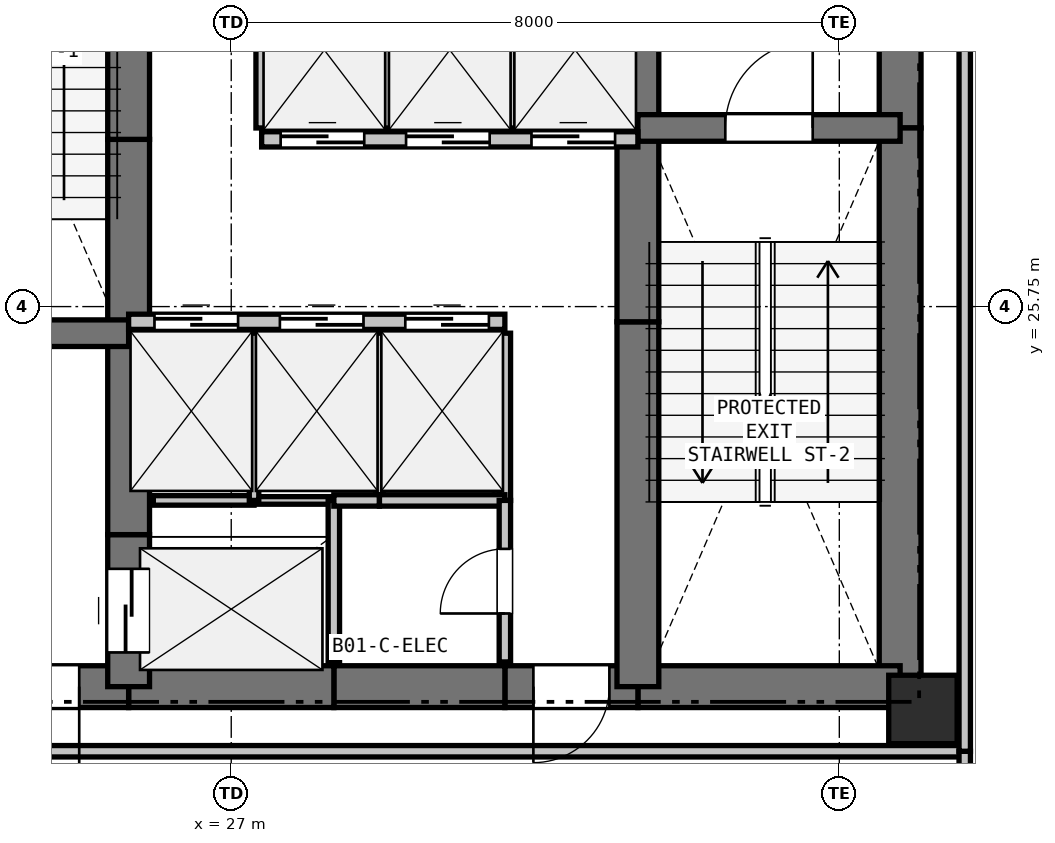
"""IFC4 building model, lengths in metres.
Left out: names, types, materials, properties, quantities, classifications, styles, units other than length and angle.
Written with IfcOpenShell. Run it as: python <this file> out.ifc"""

import sys

from ifc_helpers import new_model, si_unit, direction, frame, frame_2d, origin, origin_2d, place, context, subcontext, project, spatial, rectangle, extrude, element, fill, save


model = new_model("IFC4")
c1 = context("Model", 3, precision=1e-05, world=origin(), true_north=direction((0.0, 1.0)))
c2 = subcontext(c1, "Body", "Model", "MODEL_VIEW")
j1 = project(units=[si_unit("LENGTHUNIT", "METRE"), si_unit("PLANEANGLEUNIT", "RADIAN")], contexts=[c1])
p1 = place(None, origin())
s1 = spatial("IfcSite", under=j1, at=p1, CompositionType="ELEMENT")
p2 = place(p1, origin())
s2 = spatial("IfcBuilding", under=s1, at=p2, CompositionType="ELEMENT")
p3 = place(p2, frame((0.0, 0.0, -4.5)))
s3 = spatial("IfcBuildingStorey", under=s2, at=p3, CompositionType="ELEMENT", Elevation=-4.5)
p4 = place(p3, frame((36.1, 20.45, 0.0), z_axis=(0.0, 0.0, 1.0), x_axis=(1.0, 0.0, 0.0)))
e1 = element("IfcColumn", 1, at=p4, inside=s3, PredefinedType="COLUMN", context=c2, shape_type="SweptSolid", body=[
    extrude(rectangle(XDim=0.9, YDim=0.9, at=origin_2d()), origin(), (0.0, 0.0, 1.0), 4.5),
])
p5 = place(p3, frame((35.8, 32.75, 0.0), z_axis=(0.0, 0.0, 1.0), x_axis=(0.0, -1.0, 0.0)))
e2 = element("IfcWall", 2, at=p5, inside=s3, PredefinedType="SHEAR", context=c2, shape_type="SweptSolid", body=[
    extrude(rectangle(XDim=4.65, YDim=0.55, at=frame_2d((2.325, 0.0))), origin(), (0.0, 0.0, 1.0), 4.2),
])
p6 = place(p3, frame((35.8, 28.1, 0.0), z_axis=(0.0, 0.0, 1.0), x_axis=(0.0, -1.0, 0.0)))
e3 = element("IfcWall", 3, at=p6, inside=s3, PredefinedType="SHEAR", context=c2, shape_type="SweptSolid", body=[
    extrude(rectangle(XDim=7.35, YDim=0.55, at=frame_2d((3.675, 0.0))), origin(), (0.0, 0.0, 1.0), 4.2),
])
p7 = place(p3, frame((35.8, 20.75, 0.0), z_axis=(0.0, 0.0, 1.0), x_axis=(-1.0, 0.0, 0.0)))
e4 = element("IfcWall", 4, at=p7, inside=s3, PredefinedType="SHEAR", context=c2, shape_type="SweptSolid", body=[
    extrude(rectangle(XDim=3.45, YDim=0.55, at=frame_2d((1.725, 0.0))), origin(), (0.0, 0.0, 1.0), 4.2),
])
p8 = place(p3, frame((32.35, 20.75, 0.0), z_axis=(0.0, 0.0, 1.0), x_axis=(-1.0, 0.0, 0.0)))
e5 = element("IfcWall", 5, at=p8, inside=s3, PredefinedType="SHEAR", context=c2, shape_type="SweptSolid", body=[
    extrude(rectangle(XDim=1.75, YDim=0.55, at=frame_2d((0.875, 0.0))), origin(), (0.0, 0.0, 1.0), 4.2),
])
p9 = place(p8, frame((0.375, 0.0, 0.0)))
e6 = element("IfcOpeningElement", 6, at=p9, cuts=e5, PredefinedType="OPENING", context=c2, shape_type="SweptSolid", body=[
    extrude(rectangle(XDim=1.0, YDim=2.15, at=frame_2d((0.5, 1.075))), frame((0.0, 0.285, 0.0), z_axis=(0.0, -1.0, 0.0), x_axis=(1.0, 0.0, 0.0)), (0.0, 0.0, 1.0), 0.57),
])
p10 = place(p3, frame((30.6, 20.75, 0.0), z_axis=(0.0, 0.0, 1.0), x_axis=(-1.0, 0.0, 0.0)))
e7 = element("IfcWall", 7, at=p10, inside=s3, PredefinedType="SHEAR", context=c2, shape_type="SweptSolid", body=[
    extrude(rectangle(XDim=2.25, YDim=0.55, at=frame_2d((1.125, 0.0))), origin(), (0.0, 0.0, 1.0), 4.2),
])
p11 = place(p3, frame((28.35, 20.75, 0.0), z_axis=(0.0, 0.0, 1.0), x_axis=(-1.0, 0.0, 0.0)))
e8 = element("IfcWall", 8, at=p11, inside=s3, PredefinedType="SHEAR", context=c2, shape_type="SweptSolid", body=[
    extrude(rectangle(XDim=2.7, YDim=0.55, at=frame_2d((1.35, 0.0))), origin(), (0.0, 0.0, 1.0), 4.2),
])
p12 = place(p3, frame((25.65, 20.75, 0.0), z_axis=(0.0, 0.0, 1.0), x_axis=(-1.0, 0.0, 0.0)))
e9 = element("IfcWall", 9, at=p12, inside=s3, PredefinedType="SHEAR", context=c2, shape_type="SweptSolid", body=[
    extrude(rectangle(XDim=3.45, YDim=0.55, at=frame_2d((1.725, 0.0))), origin(), (0.0, 0.0, 1.0), 4.2),
])
p13 = place(p12, frame((0.65, 0.0, 0.0)))
e10 = element("IfcOpeningElement", 10, at=p13, cuts=e9, PredefinedType="OPENING", context=c2, shape_type="SweptSolid", body=[
    extrude(rectangle(XDim=1.15, YDim=2.15, at=frame_2d((0.575, 1.075))), frame((0.0, 0.285, 0.0), z_axis=(0.0, -1.0, 0.0), x_axis=(1.0, 0.0, 0.0)), (0.0, 0.0, 1.0), 0.57),
])
p14 = place(p3, frame((25.65, 20.75, 0.0), z_axis=(0.0, 0.0, 1.0), x_axis=(0.0, 1.0, 0.0)))
e11 = element("IfcWall", 11, at=p14, inside=s3, PredefinedType="SHEAR", context=c2, shape_type="SweptSolid", body=[
    extrude(rectangle(XDim=2.0, YDim=0.55, at=frame_2d((1.0, 0.0))), origin(), (0.0, 0.0, 1.0), 4.2),
])
p15 = place(p14, frame((0.45, 0.0, 0.0)))
e12 = element("IfcOpeningElement", 12, at=p15, cuts=e11, PredefinedType="OPENING", context=c2, shape_type="SweptSolid", body=[
    extrude(rectangle(XDim=1.1, YDim=2.15, at=frame_2d((0.55, 1.075))), frame((0.0, 0.285, 0.0), z_axis=(0.0, -1.0, 0.0), x_axis=(1.0, 0.0, 0.0)), (0.0, 0.0, 1.0), 0.57),
])
p16 = place(p3, frame((25.65, 22.75, 0.0), z_axis=(0.0, 0.0, 1.0), x_axis=(0.0, 1.0, 0.0)))
e13 = element("IfcWall", 13, at=p16, inside=s3, PredefinedType="SHEAR", context=c2, shape_type="SweptSolid", body=[
    extrude(rectangle(XDim=2.8, YDim=0.55, at=frame_2d((1.4, 0.0))), origin(), (0.0, 0.0, 1.0), 4.2),
])
p17 = place(p3, frame((25.65, 25.55, 0.0), z_axis=(0.0, 0.0, 1.0), x_axis=(0.0, 1.0, 0.0)))
e14 = element("IfcWall", 14, at=p17, inside=s3, PredefinedType="SHEAR", context=c2, shape_type="SweptSolid", body=[
    extrude(rectangle(XDim=2.4, YDim=0.55, at=frame_2d((1.2, 0.0))), origin(), (0.0, 0.0, 1.0), 4.2),
])
for number, where, z_axis, x_axis in (
    (15, (25.65, 27.95, 0.0), (0.0, 0.0, 1.0), (0.0, 1.0, 0.0)),
    (16, (32.35, 20.75, 0.0), (0.0, 0.0, 1.0), (0.0, 1.0, 0.0)),
):
    element("IfcWall", number, at=place(p3, frame(where, z_axis=z_axis, x_axis=x_axis)), inside=s3, PredefinedType="SHEAR", context=c2, shape_type="SweptSolid", body=[
        extrude(rectangle(XDim=4.8, YDim=0.55, at=frame_2d((2.4, 0.0))), origin(), (0.0, 0.0, 1.0), 4.2),
    ])
p18 = place(p3, frame((32.35, 25.55, 0.0), z_axis=(0.0, 0.0, 1.0), x_axis=(0.0, 1.0, 0.0)))
e17 = element("IfcWall", 17, at=p18, inside=s3, PredefinedType="SHEAR", context=c2, shape_type="SweptSolid", body=[
    extrude(rectangle(XDim=2.4, YDim=0.55, at=frame_2d((1.2, 0.0))), origin(), (0.0, 0.0, 1.0), 4.2),
])
p19 = place(p3, frame((32.35, 27.95, 0.0), z_axis=(0.0, 0.0, 1.0), x_axis=(0.0, 1.0, 0.0)))
e18 = element("IfcWall", 18, at=p19, inside=s3, PredefinedType="SHEAR", context=c2, shape_type="SweptSolid", body=[
    extrude(rectangle(XDim=2.8, YDim=0.55, at=frame_2d((1.4, 0.0))), origin(), (0.0, 0.0, 1.0), 4.2),
])
p20 = place(p3, frame((22.2, 25.4, 0.0), z_axis=(0.0, 0.0, 1.0), x_axis=(1.0, 0.0, 0.0)))
e19 = element("IfcWall", 19, at=p20, inside=s3, PredefinedType="SHEAR", context=c2, shape_type="SweptSolid", body=[
    extrude(rectangle(XDim=3.45, YDim=0.35, at=frame_2d((1.725, 0.0))), origin(), (0.0, 0.0, 1.0), 4.2),
])
p21 = place(p20, frame((1.15, 0.0, 0.0)))
e20 = element("IfcOpeningElement", 20, at=p21, cuts=e19, PredefinedType="OPENING", context=c2, shape_type="SweptSolid", body=[
    extrude(rectangle(XDim=1.15, YDim=2.15, at=frame_2d((0.575, 1.075))), frame((0.0, 0.185, 0.0), z_axis=(0.0, -1.0, 0.0), x_axis=(1.0, 0.0, 0.0)), (0.0, 0.0, 1.0), 0.37),
])
p22 = place(p3, frame((32.35, 28.1, 0.0), z_axis=(0.0, 0.0, 1.0), x_axis=(1.0, 0.0, 0.0)))
e21 = element("IfcWall", 21, at=p22, inside=s3, PredefinedType="SHEAR", context=c2, shape_type="SweptSolid", body=[
    extrude(rectangle(XDim=3.45, YDim=0.35, at=frame_2d((1.725, 0.0))), origin(), (0.0, 0.0, 1.0), 4.2),
])
p23 = place(p22, frame((1.15, 0.0, 0.0)))
e22 = element("IfcOpeningElement", 22, at=p23, cuts=e21, PredefinedType="OPENING", context=c2, shape_type="SweptSolid", body=[
    extrude(rectangle(XDim=1.15, YDim=2.15, at=frame_2d((0.575, 1.075))), frame((0.0, 0.185, 0.0), z_axis=(0.0, -1.0, 0.0), x_axis=(1.0, 0.0, 0.0)), (0.0, 0.0, 1.0), 0.37),
])
p24 = place(p3, frame((25.65, 25.55, 0.0), z_axis=(0.0, 0.0, 1.0), x_axis=(1.0, 0.0, 0.0)))
e23 = element("IfcWall", 23, at=p24, inside=s3, PredefinedType="PARTITIONING", context=c2, shape_type="SweptSolid", body=[
    extrude(rectangle(XDim=4.95, YDim=0.2, at=frame_2d((2.475, 0.0))), origin(), (0.0, 0.0, 1.0), 4.2),
])
p25 = place(p24, frame((0.34, 0.0, 0.0)))
e24 = element("IfcOpeningElement", 24, at=p25, cuts=e23, PredefinedType="OPENING", context=c2, shape_type="SweptSolid", body=[
    extrude(rectangle(XDim=1.1, YDim=2.15, at=frame_2d((0.55, 1.075))), frame((0.0, 0.11, 0.0), z_axis=(0.0, -1.0, 0.0), x_axis=(1.0, 0.0, 0.0)), (0.0, 0.0, 1.0), 0.22),
])
p26 = place(p24, frame((1.99, 0.0, 0.0)))
e25 = element("IfcOpeningElement", 25, at=p26, cuts=e23, PredefinedType="OPENING", context=c2, shape_type="SweptSolid", body=[
    extrude(rectangle(XDim=1.1, YDim=2.15, at=frame_2d((0.55, 1.075))), frame((0.0, 0.11, 0.0), z_axis=(0.0, -1.0, 0.0), x_axis=(1.0, 0.0, 0.0)), (0.0, 0.0, 1.0), 0.22),
])
p27 = place(p24, frame((3.64, 0.0, 0.0)))
e26 = element("IfcOpeningElement", 26, at=p27, cuts=e23, PredefinedType="OPENING", context=c2, shape_type="SweptSolid", body=[
    extrude(rectangle(XDim=1.1, YDim=2.15, at=frame_2d((0.55, 1.075))), frame((0.0, 0.11, 0.0), z_axis=(0.0, -1.0, 0.0), x_axis=(1.0, 0.0, 0.0)), (0.0, 0.0, 1.0), 0.22),
])
p28 = place(p3, frame((27.4, 27.95, 0.0), z_axis=(0.0, 0.0, 1.0), x_axis=(1.0, 0.0, 0.0)))
e27 = element("IfcWall", 27, at=p28, inside=s3, PredefinedType="PARTITIONING", context=c2, shape_type="SweptSolid", body=[
    extrude(rectangle(XDim=4.95, YDim=0.2, at=frame_2d((2.475, 0.0))), origin(), (0.0, 0.0, 1.0), 4.2),
])
p29 = place(p28, frame((0.25, 0.0, 0.0)))
e28 = element("IfcOpeningElement", 28, at=p29, cuts=e27, PredefinedType="OPENING", context=c2, shape_type="SweptSolid", body=[
    extrude(rectangle(XDim=1.1, YDim=2.15, at=frame_2d((0.55, 1.075))), frame((0.0, 0.11, 0.0), z_axis=(0.0, -1.0, 0.0), x_axis=(1.0, 0.0, 0.0)), (0.0, 0.0, 1.0), 0.22),
])
p30 = place(p28, frame((1.9, 0.0, 0.0)))
e29 = element("IfcOpeningElement", 29, at=p30, cuts=e27, PredefinedType="OPENING", context=c2, shape_type="SweptSolid", body=[
    extrude(rectangle(XDim=1.1, YDim=2.15, at=frame_2d((0.55, 1.075))), frame((0.0, 0.11, 0.0), z_axis=(0.0, -1.0, 0.0), x_axis=(1.0, 0.0, 0.0)), (0.0, 0.0, 1.0), 0.22),
])
p31 = place(p28, frame((3.55, 0.0, 0.0)))
e30 = element("IfcOpeningElement", 30, at=p31, cuts=e27, PredefinedType="OPENING", context=c2, shape_type="SweptSolid", body=[
    extrude(rectangle(XDim=1.1, YDim=2.15, at=frame_2d((0.55, 1.075))), frame((0.0, 0.11, 0.0), z_axis=(0.0, -1.0, 0.0), x_axis=(1.0, 0.0, 0.0)), (0.0, 0.0, 1.0), 0.22),
])
p32 = place(p3, frame((25.975, 23.2, 0.0), z_axis=(0.0, 0.0, 1.0), x_axis=(1.0, 0.0, 0.0)))
e31 = element("IfcWall", 31, at=p32, inside=s3, PredefinedType="PARTITIONING", context=c2, shape_type="SweptSolid", body=[
    extrude(rectangle(XDim=1.325, YDim=0.125, at=frame_2d((0.663, 0.0))), origin(), (0.0, 0.0, 1.0), 4.2),
])
p33 = place(p3, frame((27.3, 23.2, 0.0), z_axis=(0.0, 0.0, 1.0), x_axis=(1.0, 0.0, 0.0)))
e32 = element("IfcWall", 32, at=p33, inside=s3, PredefinedType="PARTITIONING", context=c2, shape_type="SweptSolid", body=[
    extrude(rectangle(XDim=1.05, YDim=0.1, at=frame_2d((0.525, 0.0))), origin(), (0.0, 0.0, 1.0), 4.2),
])
p34 = place(p3, frame((28.35, 23.2, 0.0), z_axis=(0.0, 0.0, 1.0), x_axis=(0.0, -1.0, 0.0)))
e33 = element("IfcWall", 33, at=p34, inside=s3, PredefinedType="PARTITIONING", context=c2, shape_type="SweptSolid", body=[
    extrude(rectangle(XDim=2.125, YDim=0.15, at=frame_2d((1.062, 0.0))), origin(), (0.0, 0.0, 1.0), 4.2),
])
p35 = place(p3, frame((27.3, 25.4, 0.0), z_axis=(0.0, 0.0, 1.0), x_axis=(0.0, -1.0, 0.0)))
e34 = element("IfcWall", 34, at=p35, inside=s3, PredefinedType="PARTITIONING", context=c2, shape_type="SweptSolid", body=[
    extrude(rectangle(XDim=2.2, YDim=0.125, at=frame_2d((1.1, 0.0))), origin(), (0.0, 0.0, 1.0), 4.2),
])
p36 = place(p3, frame((28.95, 25.4, 0.0), z_axis=(0.0, 0.0, 1.0), x_axis=(0.0, -1.0, 0.0)))
e35 = element("IfcWall", 35, at=p36, inside=s3, PredefinedType="PARTITIONING", context=c2, shape_type="SweptSolid", body=[
    extrude(rectangle(XDim=2.2, YDim=0.1, at=frame_2d((1.1, 0.0))), origin(), (0.0, 0.0, 1.0), 4.2),
])
p37 = place(p3, frame((28.95, 23.2, 0.0), z_axis=(0.0, 0.0, 1.0), x_axis=(-1.0, 0.0, 0.0)))
e36 = element("IfcWall", 36, at=p37, inside=s3, PredefinedType="PARTITIONING", context=c2, shape_type="SweptSolid", body=[
    extrude(rectangle(XDim=0.6, YDim=0.15, at=frame_2d((0.3, 0.0))), origin(), (0.0, 0.0, 1.0), 4.2),
])
p38 = place(p3, frame((30.6, 25.4, 0.0), z_axis=(0.0, 0.0, 1.0), x_axis=(0.0, -1.0, 0.0)))
e37 = element("IfcWall", 37, at=p38, inside=s3, PredefinedType="PARTITIONING", context=c2, shape_type="SweptSolid", body=[
    extrude(rectangle(XDim=2.2, YDim=0.15, at=frame_2d((1.1, 0.0))), origin(), (0.0, 0.0, 1.0), 4.2),
])
p39 = place(p3, frame((30.6, 23.2, 0.0), z_axis=(0.0, 0.0, 1.0), x_axis=(-1.0, 0.0, 0.0)))
e38 = element("IfcWall", 38, at=p39, inside=s3, PredefinedType="PARTITIONING", context=c2, shape_type="SweptSolid", body=[
    extrude(rectangle(XDim=1.65, YDim=0.15, at=frame_2d((0.825, 0.0))), origin(), (0.0, 0.0, 1.0), 4.2),
])
p40 = place(p3, frame((29.05, 30.3, 0.0), z_axis=(0.0, 0.0, 1.0), x_axis=(0.0, -1.0, 0.0)))
e39 = element("IfcWall", 39, at=p40, inside=s3, PredefinedType="PARTITIONING", context=c2, shape_type="SweptSolid", body=[
    extrude(rectangle(XDim=2.2, YDim=0.125, at=frame_2d((1.1, 0.0))), origin(), (0.0, 0.0, 1.0), 4.2),
])
p41 = place(p3, frame((27.4, 28.1, 0.0), z_axis=(0.0, 0.0, 1.0), x_axis=(0.0, 1.0, 0.0)))
e40 = element("IfcWall", 40, at=p41, inside=s3, PredefinedType="PARTITIONING", context=c2, shape_type="SweptSolid", body=[
    extrude(rectangle(XDim=2.2, YDim=0.15, at=frame_2d((1.1, 0.0))), origin(), (0.0, 0.0, 1.0), 4.2),
])
p42 = place(p3, frame((30.7, 30.3, 0.0), z_axis=(0.0, 0.0, 1.0), x_axis=(0.0, -1.0, 0.0)))
e41 = element("IfcWall", 41, at=p42, inside=s3, PredefinedType="PARTITIONING", context=c2, shape_type="SweptSolid", body=[
    extrude(rectangle(XDim=2.2, YDim=0.1, at=frame_2d((1.1, 0.0))), origin(), (0.0, 0.0, 1.0), 4.2),
])
p43 = place(p3, frame((30.6, 21.075, 0.0), z_axis=(0.0, 0.0, 1.0), x_axis=(0.0, 1.0, 0.0)))
e42 = element("IfcWall", 42, at=p43, inside=s3, PredefinedType="PARTITIONING", context=c2, shape_type="SweptSolid", body=[
    extrude(rectangle(XDim=2.125, YDim=0.15, at=frame_2d((1.062, 0.0))), origin(), (0.0, 0.0, 1.0), 4.2),
])
p44 = place(p43, frame((0.637, 0.0, 0.0)))
e43 = element("IfcOpeningElement", 43, at=p44, cuts=e42, PredefinedType="OPENING", context=c2, shape_type="SweptSolid", body=[
    extrude(rectangle(XDim=0.85, YDim=2.1, at=frame_2d((0.425, 1.05))), frame((0.0, 0.085, 0.0), z_axis=(0.0, -1.0, 0.0), x_axis=(1.0, 0.0, 0.0)), (0.0, 0.0, 1.0), 0.17),
])
p45 = place(p3, frame((21.35, 19.9, 0.0), z_axis=(0.0, 0.0, 1.0), x_axis=(1.0, 0.0, 0.0)))
e44 = element("IfcWall", 44, at=p45, inside=s3, PredefinedType="PARTITIONING", context=c2, shape_type="SweptSolid", body=[
    extrude(rectangle(XDim=15.3, YDim=0.15, at=frame_2d((7.65, 0.0))), origin(), (0.0, 0.0, 1.0), 4.2),
])
p46 = place(p3, frame((36.65, 19.9, 0.0), z_axis=(0.0, 0.0, 1.0), x_axis=(0.0, -1.0, 0.0)))
e45 = element("IfcWall", 45, at=p46, inside=s3, PredefinedType="PARTITIONING", context=c2, shape_type="SweptSolid", body=[
    extrude(rectangle(XDim=3.2, YDim=0.15, at=frame_2d((1.6, 0.0))), origin(), (0.0, 0.0, 1.0), 4.2),
])
p47 = place(p46, frame((1.1, 0.0, 0.0)))
e46 = element("IfcOpeningElement", 46, at=p47, cuts=e45, PredefinedType="OPENING", context=c2, shape_type="SweptSolid", body=[
    extrude(rectangle(XDim=1.0, YDim=2.15, at=frame_2d((0.5, 1.075))), frame((0.0, 0.085, 0.0), z_axis=(0.0, -1.0, 0.0), x_axis=(1.0, 0.0, 0.0)), (0.0, 0.0, 1.0), 0.17),
])
p48 = place(p3, frame((36.65, 19.9, 0.0), z_axis=(0.0, 0.0, 1.0), x_axis=(0.0, 1.0, 0.0)))
e47 = element("IfcWall", 47, at=p48, inside=s3, PredefinedType="PARTITIONING", context=c2, shape_type="SweptSolid", body=[
    extrude(rectangle(XDim=13.7, YDim=0.15, at=frame_2d((6.85, 0.0))), origin(), (0.0, 0.0, 1.0), 4.2),
])
p49 = place(p25, origin())
e48 = element("IfcDoor", 48, at=p49, inside=s3, OperationType="SLIDING_TO_LEFT", PredefinedType="DOOR", context=c2, shape_type="SweptSolid", body=[
    extrude(rectangle(XDim=1.1, YDim=2.15, at=frame_2d((0.55, 1.075))), frame((0.0, 0.025, 0.0), z_axis=(0.0, -1.0, 0.0), x_axis=(1.0, 0.0, 0.0)), (0.0, 0.0, 1.0), 0.05),
])
fill(e24, e48)
p50 = place(p26, origin())
e49 = element("IfcDoor", 49, at=p50, inside=s3, OperationType="SLIDING_TO_LEFT", PredefinedType="DOOR", context=c2, shape_type="SweptSolid", body=[
    extrude(rectangle(XDim=1.1, YDim=2.15, at=frame_2d((0.55, 1.075))), frame((0.0, 0.025, 0.0), z_axis=(0.0, -1.0, 0.0), x_axis=(1.0, 0.0, 0.0)), (0.0, 0.0, 1.0), 0.05),
])
fill(e25, e49)
p51 = place(p27, origin())
e50 = element("IfcDoor", 50, at=p51, inside=s3, OperationType="SLIDING_TO_LEFT", PredefinedType="DOOR", context=c2, shape_type="SweptSolid", body=[
    extrude(rectangle(XDim=1.1, YDim=2.15, at=frame_2d((0.55, 1.075))), frame((0.0, 0.025, 0.0), z_axis=(0.0, -1.0, 0.0), x_axis=(1.0, 0.0, 0.0)), (0.0, 0.0, 1.0), 0.05),
])
fill(e26, e50)
p52 = place(p29, origin())
e51 = element("IfcDoor", 51, at=p52, inside=s3, OperationType="SLIDING_TO_LEFT", PredefinedType="DOOR", context=c2, shape_type="SweptSolid", body=[
    extrude(rectangle(XDim=1.1, YDim=2.15, at=frame_2d((0.55, 1.075))), frame((0.0, 0.025, 0.0), z_axis=(0.0, -1.0, 0.0), x_axis=(1.0, 0.0, 0.0)), (0.0, 0.0, 1.0), 0.05),
])
fill(e28, e51)
p53 = place(p30, origin())
e52 = element("IfcDoor", 52, at=p53, inside=s3, OperationType="SLIDING_TO_LEFT", PredefinedType="DOOR", context=c2, shape_type="SweptSolid", body=[
    extrude(rectangle(XDim=1.1, YDim=2.15, at=frame_2d((0.55, 1.075))), frame((0.0, 0.025, 0.0), z_axis=(0.0, -1.0, 0.0), x_axis=(1.0, 0.0, 0.0)), (0.0, 0.0, 1.0), 0.05),
])
fill(e29, e52)
p54 = place(p31, origin())
e53 = element("IfcDoor", 53, at=p54, inside=s3, OperationType="SLIDING_TO_LEFT", PredefinedType="DOOR", context=c2, shape_type="SweptSolid", body=[
    extrude(rectangle(XDim=1.1, YDim=2.15, at=frame_2d((0.55, 1.075))), frame((0.0, 0.025, 0.0), z_axis=(0.0, -1.0, 0.0), x_axis=(1.0, 0.0, 0.0)), (0.0, 0.0, 1.0), 0.05),
])
fill(e30, e53)
p55 = place(p9, origin())
e54 = element("IfcDoor", 54, at=p55, inside=s3, OperationType="SINGLE_SWING_RIGHT", PredefinedType="DOOR", context=c2, shape_type="SweptSolid", body=[
    extrude(rectangle(XDim=1.0, YDim=2.15, at=frame_2d((0.5, 1.075))), frame((0.0, 0.025, 0.0), z_axis=(0.0, -1.0, 0.0), x_axis=(1.0, 0.0, 0.0)), (0.0, 0.0, 1.0), 0.05),
])
fill(e6, e54)
p56 = place(p15, origin())
e55 = element("IfcDoor", 55, at=p56, inside=s3, OperationType="SLIDING_TO_LEFT", PredefinedType="DOOR", context=c2, shape_type="SweptSolid", body=[
    extrude(rectangle(XDim=1.1, YDim=2.15, at=frame_2d((0.55, 1.075))), frame((0.0, 0.025, 0.0), z_axis=(0.0, -1.0, 0.0), x_axis=(1.0, 0.0, 0.0)), (0.0, 0.0, 1.0), 0.05),
])
fill(e12, e55)
p57 = place(p23, origin())
e56 = element("IfcDoor", 56, at=p57, inside=s3, OperationType="SINGLE_SWING_RIGHT", PredefinedType="DOOR", context=c2, shape_type="SweptSolid", body=[
    extrude(rectangle(XDim=1.15, YDim=2.15, at=frame_2d((0.575, 1.075))), frame((0.0, 0.025, 0.0), z_axis=(0.0, -1.0, 0.0), x_axis=(1.0, 0.0, 0.0)), (0.0, 0.0, 1.0), 0.05),
])
fill(e22, e56)
p58 = place(p13, origin())
e57 = element("IfcDoor", 57, at=p58, inside=s3, OperationType="SINGLE_SWING_LEFT", PredefinedType="DOOR", context=c2, shape_type="SweptSolid", body=[
    extrude(rectangle(XDim=1.15, YDim=2.15, at=frame_2d((0.575, 1.075))), frame((0.0, 0.025, 0.0), z_axis=(0.0, -1.0, 0.0), x_axis=(1.0, 0.0, 0.0)), (0.0, 0.0, 1.0), 0.05),
])
fill(e10, e57)
p59 = place(p44, origin())
e58 = element("IfcDoor", 58, at=p59, inside=s3, OperationType="SINGLE_SWING_LEFT", PredefinedType="DOOR", context=c2, shape_type="SweptSolid", body=[
    extrude(rectangle(XDim=0.85, YDim=2.1, at=frame_2d((0.425, 1.05))), frame((0.0, 0.025, 0.0), z_axis=(0.0, -1.0, 0.0), x_axis=(1.0, 0.0, 0.0)), (0.0, 0.0, 1.0), 0.05),
])
fill(e43, e58)
save(model, sys.argv[1])
